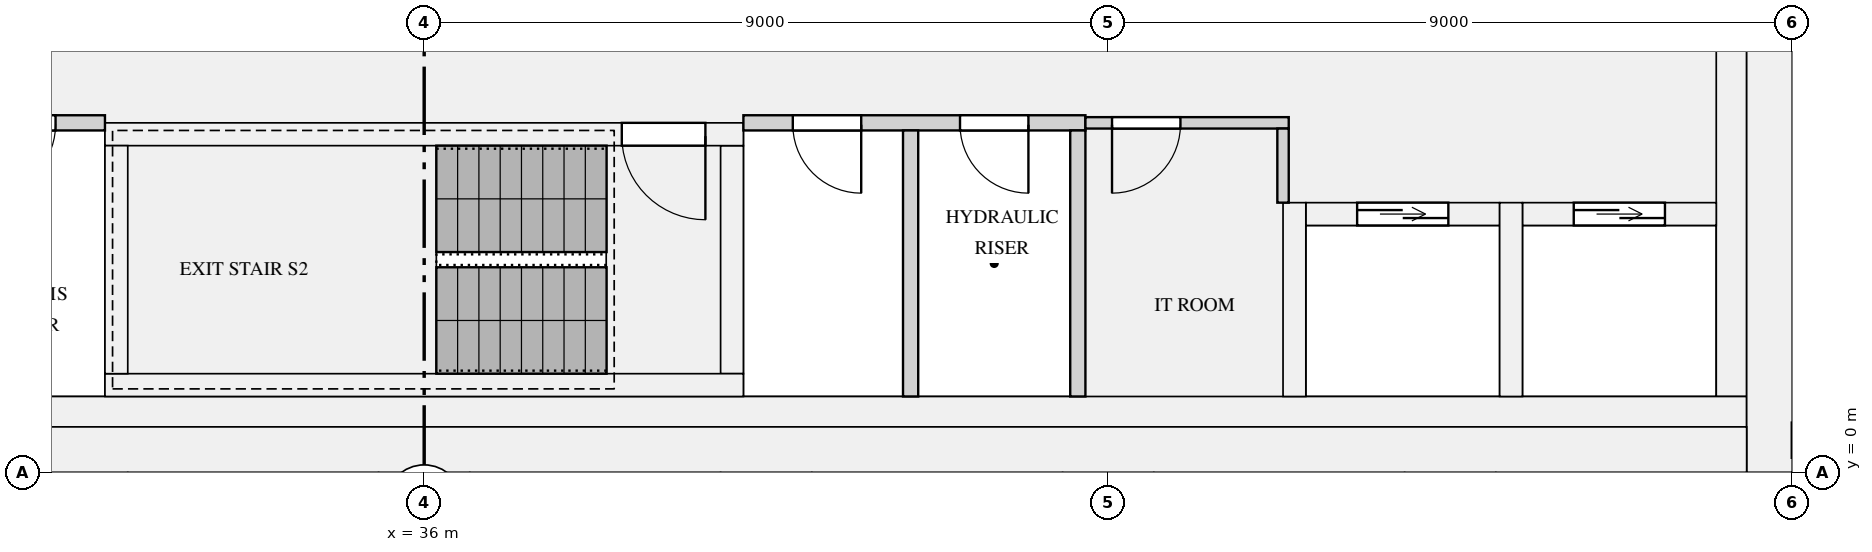
"""IFC4 building model, lengths in metres.
Left out: names, types, materials, properties, quantities, classifications, styles, units other than length and angle.
Written with IfcOpenShell. Run it as: python <this file> out.ifc"""

import sys

from ifc_helpers import new_model, si_unit, direction, frame, frame_2d, origin, place, context, subcontext, project, spatial, rectangle, extrude, element, fill, save


model = new_model("IFC4")
c1 = context("Model", 3, precision=1e-05, world=origin(), true_north=direction((0.0, 1.0)))
c2 = subcontext(c1, "Body", "Model", "MODEL_VIEW")
j1 = project(units=[si_unit("LENGTHUNIT", "METRE"), si_unit("PLANEANGLEUNIT", "RADIAN")], contexts=[c1])
p1 = place(None, origin())
s1 = spatial("IfcSite", under=j1, at=p1, CompositionType="ELEMENT")
p2 = place(p1, origin())
s2 = spatial("IfcBuilding", under=s1, at=p2, CompositionType="ELEMENT")
p3 = place(p2, frame((0.0, 0.0, 216.9)))
s3 = spatial("IfcBuildingStorey", under=s2, at=p3, CompositionType="ELEMENT", Elevation=216.9)
p4 = place(p3, frame((53.7, 0.0, 0.0), z_axis=(0.0, 0.0, 1.0), x_axis=(0.0, 1.0, 0.0)))
e1 = element("IfcWall", 1, at=p4, inside=s3, PredefinedType="SHEAR", context=c2, shape_type="SweptSolid", body=[
    extrude(rectangle(XDim=12.5, YDim=0.6, at=frame_2d((6.25, 0.0))), origin(), (0.0, 0.0, 1.0), 3.15),
])
p5 = place(p3, frame((18.6, 0.3, 0.0), z_axis=(0.0, 0.0, 1.0), x_axis=(1.0, 0.0, 0.0)))
e2 = element("IfcWall", 2, at=p5, inside=s3, PredefinedType="SHEAR", context=c2, shape_type="SweptSolid", body=[
    extrude(rectangle(XDim=34.8, YDim=0.6, at=frame_2d((17.4, 0.0))), origin(), (0.0, 0.0, 1.0), 3.15),
])
p6 = place(p3, frame((53.2, 1.0, 0.0), z_axis=(0.0, 0.0, 1.0), x_axis=(0.0, 1.0, 0.0)))
e3 = element("IfcWall", 3, at=p6, inside=s3, PredefinedType="SHEAR", context=c2, shape_type="SweptSolid", body=[
    extrude(rectangle(XDim=10.9, YDim=0.4, at=frame_2d((5.45, 0.0))), origin(), (0.0, 0.0, 1.0), 3.15),
])
p7 = place(p3, frame((18.6, 0.8, 0.0), z_axis=(0.0, 0.0, 1.0), x_axis=(1.0, 0.0, 0.0)))
e4 = element("IfcWall", 4, at=p7, inside=s3, PredefinedType="SHEAR", context=c2, shape_type="SweptSolid", body=[
    extrude(rectangle(XDim=34.8, YDim=0.4, at=frame_2d((17.4, 0.0))), origin(), (0.0, 0.0, 1.0), 3.15),
])
p8 = place(p3, frame((47.6, 3.4, 0.0), z_axis=(0.0, 0.0, 1.0), x_axis=(1.0, 0.0, 0.0)))
e5 = element("IfcWall", 5, at=p8, inside=s3, PredefinedType="SHEAR", context=c2, shape_type="SweptSolid", body=[
    extrude(rectangle(XDim=2.55, YDim=0.3, at=frame_2d((1.275, 0.0))), origin(), (0.0, 0.0, 1.0), 3.15),
])
p9 = place(p8, frame((0.675, 0.0, 0.0)))
e6 = element("IfcOpeningElement", 6, at=p9, cuts=e5, PredefinedType="OPENING", context=c2, shape_type="SweptSolid", body=[
    extrude(rectangle(XDim=1.2, YDim=2.1, at=frame_2d((0.6, 1.05))), frame((0.0, 0.16, 0.0), z_axis=(0.0, -1.0, 0.0), x_axis=(1.0, 0.0, 0.0)), (0.0, 0.0, 1.0), 0.32),
])
p10 = place(p3, frame((47.45, 1.0, 0.0), z_axis=(0.0, 0.0, 1.0), x_axis=(0.0, 1.0, 0.0)))
e7 = element("IfcWall", 7, at=p10, inside=s3, PredefinedType="SHEAR", context=c2, shape_type="SweptSolid", body=[
    extrude(rectangle(XDim=2.55, YDim=0.3, at=frame_2d((1.275, 0.0))), origin(), (0.0, 0.0, 1.0), 3.15),
])
p11 = place(p3, frame((50.45, 3.4, 0.0), z_axis=(0.0, 0.0, 1.0), x_axis=(1.0, 0.0, 0.0)))
e8 = element("IfcWall", 8, at=p11, inside=s3, PredefinedType="SHEAR", context=c2, shape_type="SweptSolid", body=[
    extrude(rectangle(XDim=2.55, YDim=0.3, at=frame_2d((1.275, 0.0))), origin(), (0.0, 0.0, 1.0), 3.15),
])
p12 = place(p11, frame((0.675, 0.0, 0.0)))
e9 = element("IfcOpeningElement", 9, at=p12, cuts=e8, PredefinedType="OPENING", context=c2, shape_type="SweptSolid", body=[
    extrude(rectangle(XDim=1.2, YDim=2.1, at=frame_2d((0.6, 1.05))), frame((0.0, 0.16, 0.0), z_axis=(0.0, -1.0, 0.0), x_axis=(1.0, 0.0, 0.0)), (0.0, 0.0, 1.0), 0.32),
])
p13 = place(p3, frame((50.3, 1.0, 0.0), z_axis=(0.0, 0.0, 1.0), x_axis=(0.0, 1.0, 0.0)))
e10 = element("IfcWall", 10, at=p13, inside=s3, PredefinedType="SHEAR", context=c2, shape_type="SweptSolid", body=[
    extrude(rectangle(XDim=2.55, YDim=0.3, at=frame_2d((1.275, 0.0))), origin(), (0.0, 0.0, 1.0), 3.15),
])
p14 = place(p3, frame((31.8, 1.15, 0.0), z_axis=(0.0, 0.0, 1.0), x_axis=(1.0, 0.0, 0.0)))
e11 = element("IfcWall", 11, at=p14, inside=s3, PredefinedType="SHEAR", context=c2, shape_type="SweptSolid", body=[
    extrude(rectangle(XDim=8.4, YDim=0.3, at=frame_2d((4.2, 0.0))), origin(), (0.0, 0.0, 1.0), 3.15),
])
p15 = place(p3, frame((31.8, 4.45, 0.0), z_axis=(0.0, 0.0, 1.0), x_axis=(1.0, 0.0, 0.0)))
e12 = element("IfcWall", 12, at=p15, inside=s3, PredefinedType="SHEAR", context=c2, shape_type="SweptSolid", body=[
    extrude(rectangle(XDim=8.4, YDim=0.3, at=frame_2d((4.2, 0.0))), origin(), (0.0, 0.0, 1.0), 3.15),
])
p16 = place(p15, frame((6.8, 0.0, 0.0)))
e13 = element("IfcOpeningElement", 13, at=p16, cuts=e12, PredefinedType="OPENING", context=c2, shape_type="SweptSolid", body=[
    extrude(rectangle(XDim=1.1, YDim=2.1, at=frame_2d((0.55, 1.05))), frame((0.0, 0.16, 0.0), z_axis=(0.0, -1.0, 0.0), x_axis=(1.0, 0.0, 0.0)), (0.0, 0.0, 1.0), 0.32),
])
for number, where, z_axis, x_axis in (
    (14, (31.95, 1.3, 0.0), (0.0, 0.0, 1.0), (0.0, 1.0, 0.0)),
    (15, (40.05, 1.3, 0.0), (0.0, 0.0, 1.0), (0.0, 1.0, 0.0)),
):
    element("IfcWall", number, at=place(p3, frame(where, z_axis=z_axis, x_axis=x_axis)), inside=s3, PredefinedType="SHEAR", context=c2, shape_type="SweptSolid", body=[
        extrude(rectangle(XDim=3.0, YDim=0.3, at=frame_2d((1.5, 0.0))), origin(), (0.0, 0.0, 1.0), 3.15),
    ])
p17 = place(p3, frame((54.0, 0.425, 0.9), z_axis=(0.0, 0.0, 1.0), x_axis=(1.0, 0.0, 0.0)))
e16 = element("IfcWall", 16, at=p17, inside=s3, PredefinedType="SOLIDWALL", context=c2, shape_type="SweptSolid", body=[
    extrude(rectangle(XDim=4.05, YDim=0.45, at=frame_2d((2.025, 0.0))), origin(), (0.0, 0.0, 1.0), 1.93),
])
p18 = place(p17, frame((1.275, 0.0, 0.15)))
e17 = element("IfcOpeningElement", 17, at=p18, cuts=e16, PredefinedType="OPENING", context=c2, shape_type="SweptSolid", body=[
    extrude(rectangle(XDim=1.5, YDim=1.5, at=frame_2d((0.75, 0.75))), frame((0.0, 0.235, 0.0), z_axis=(0.0, -1.0, 0.0), x_axis=(1.0, 0.0, 0.0)), (0.0, 0.0, 1.0), 0.47),
])
p19 = place(p3, frame((27.3, 4.6, 0.0), z_axis=(0.0, 0.0, 1.0), x_axis=(1.0, 0.0, 0.0)))
e18 = element("IfcWall", 18, at=p19, inside=s3, PredefinedType="PARTITIONING", context=c2, shape_type="SweptSolid", body=[
    extrude(rectangle(XDim=4.5, YDim=0.2, at=frame_2d((2.25, 0.0))), origin(), (0.0, 0.0, 1.0), 2.83),
])
p20 = place(p19, frame((0.75, 0.0, 0.0)))
e19 = element("IfcOpeningElement", 19, at=p20, cuts=e18, PredefinedType="OPENING", context=c2, shape_type="SweptSolid", body=[
    extrude(rectangle(XDim=0.9, YDim=2.1, at=frame_2d((0.45, 1.05))), frame((0.0, 0.11, 0.0), z_axis=(0.0, -1.0, 0.0), x_axis=(1.0, 0.0, 0.0)), (0.0, 0.0, 1.0), 0.22),
])
p21 = place(p19, frame((2.95, 0.0, 0.0)))
e20 = element("IfcOpeningElement", 20, at=p21, cuts=e18, PredefinedType="OPENING", context=c2, shape_type="SweptSolid", body=[
    extrude(rectangle(XDim=0.9, YDim=2.1, at=frame_2d((0.45, 1.05))), frame((0.0, 0.11, 0.0), z_axis=(0.0, -1.0, 0.0), x_axis=(1.0, 0.0, 0.0)), (0.0, 0.0, 1.0), 0.22),
])
p22 = place(p3, frame((40.2, 4.6, 0.0), z_axis=(0.0, 0.0, 1.0), x_axis=(1.0, 0.0, 0.0)))
e21 = element("IfcWall", 21, at=p22, inside=s3, PredefinedType="PARTITIONING", context=c2, shape_type="SweptSolid", body=[
    extrude(rectangle(XDim=4.5, YDim=0.2, at=frame_2d((2.25, 0.0))), origin(), (0.0, 0.0, 1.0), 2.83),
])
p23 = place(p22, frame((0.65, 0.0, 0.0)))
e22 = element("IfcOpeningElement", 22, at=p23, cuts=e21, PredefinedType="OPENING", context=c2, shape_type="SweptSolid", body=[
    extrude(rectangle(XDim=0.9, YDim=2.1, at=frame_2d((0.45, 1.05))), frame((0.0, 0.11, 0.0), z_axis=(0.0, -1.0, 0.0), x_axis=(1.0, 0.0, 0.0)), (0.0, 0.0, 1.0), 0.22),
])
p24 = place(p22, frame((2.85, 0.0, 0.0)))
e23 = element("IfcOpeningElement", 23, at=p24, cuts=e21, PredefinedType="OPENING", context=c2, shape_type="SweptSolid", body=[
    extrude(rectangle(XDim=0.9, YDim=2.1, at=frame_2d((0.45, 1.05))), frame((0.0, 0.11, 0.0), z_axis=(0.0, -1.0, 0.0), x_axis=(1.0, 0.0, 0.0)), (0.0, 0.0, 1.0), 0.22),
])
p25 = place(p3, frame((44.7, 4.6, 0.0), z_axis=(0.0, 0.0, 1.0), x_axis=(1.0, 0.0, 0.0)))
e24 = element("IfcWall", 24, at=p25, inside=s3, PredefinedType="PARTITIONING", context=c2, shape_type="SweptSolid", body=[
    extrude(rectangle(XDim=2.675, YDim=0.15, at=frame_2d((1.337, 0.0))), origin(), (0.0, 0.0, 1.0), 2.83),
])
p26 = place(p25, frame((0.35, 0.0, 0.0)))
e25 = element("IfcOpeningElement", 25, at=p26, cuts=e24, PredefinedType="OPENING", context=c2, shape_type="SweptSolid", body=[
    extrude(rectangle(XDim=0.9, YDim=2.1, at=frame_2d((0.45, 1.05))), frame((0.0, 0.085, 0.0), z_axis=(0.0, -1.0, 0.0), x_axis=(1.0, 0.0, 0.0)), (0.0, 0.0, 1.0), 0.17),
])
for number, where, z_axis, x_axis in (
    (26, (42.4, 1.0, 0.0), (0.0, 0.0, 1.0), (0.0, 1.0, 0.0)),
    (27, (44.6, 1.0, 0.0), (0.0, 0.0, 1.0), (0.0, 1.0, 0.0)),
):
    element("IfcWall", number, at=place(p3, frame(where, z_axis=z_axis, x_axis=x_axis)), inside=s3, PredefinedType="PARTITIONING", context=c2, shape_type="SweptSolid", body=[
        extrude(rectangle(XDim=3.5, YDim=0.2, at=frame_2d((1.75, 0.0))), origin(), (0.0, 0.0, 1.0), 2.83),
    ])
p27 = place(p3, frame((47.3, 3.55, 0.0), z_axis=(0.0, 0.0, 1.0), x_axis=(0.0, 1.0, 0.0)))
e28 = element("IfcWall", 28, at=p27, inside=s3, PredefinedType="PARTITIONING", context=c2, shape_type="SweptSolid", body=[
    extrude(rectangle(XDim=0.975, YDim=0.15, at=frame_2d((0.487, 0.0))), origin(), (0.0, 0.0, 1.0), 2.83),
])
p28 = place(p9, origin())
e29 = element("IfcDoor", 29, at=p28, inside=s3, OperationType="DOUBLE_DOOR_SLIDING", PredefinedType="DOOR", context=c2, shape_type="SweptSolid", body=[
    extrude(rectangle(XDim=1.2, YDim=2.1, at=frame_2d((0.6, 1.05))), frame((0.0, 0.025, 0.0), z_axis=(0.0, -1.0, 0.0), x_axis=(1.0, 0.0, 0.0)), (0.0, 0.0, 1.0), 0.05),
])
fill(e6, e29)
p29 = place(p12, origin())
e30 = element("IfcDoor", 30, at=p29, inside=s3, OperationType="DOUBLE_DOOR_SLIDING", PredefinedType="DOOR", context=c2, shape_type="SweptSolid", body=[
    extrude(rectangle(XDim=1.2, YDim=2.1, at=frame_2d((0.6, 1.05))), frame((0.0, 0.025, 0.0), z_axis=(0.0, -1.0, 0.0), x_axis=(1.0, 0.0, 0.0)), (0.0, 0.0, 1.0), 0.05),
])
fill(e9, e30)
p30 = place(p16, frame((1.1, 0.0, 0.0), z_axis=(0.0, 0.0, 1.0), x_axis=(-1.0, 0.0, 0.0)))
e31 = element("IfcDoor", 31, at=p30, inside=s3, OperationType="SINGLE_SWING_LEFT", PredefinedType="DOOR", context=c2, shape_type="SweptSolid", body=[
    extrude(rectangle(XDim=1.1, YDim=2.1, at=frame_2d((0.55, 1.05))), frame((0.0, 0.025, 0.0), z_axis=(0.0, -1.0, 0.0), x_axis=(1.0, 0.0, 0.0)), (0.0, 0.0, 1.0), 0.05),
])
fill(e13, e31)
p31 = place(p26, frame((0.9, 0.0, 0.0), z_axis=(0.0, 0.0, 1.0), x_axis=(-1.0, 0.0, 0.0)))
e32 = element("IfcDoor", 32, at=p31, inside=s3, OperationType="SINGLE_SWING_RIGHT", PredefinedType="DOOR", context=c2, shape_type="SweptSolid", body=[
    extrude(rectangle(XDim=0.9, YDim=2.1, at=frame_2d((0.45, 1.05))), frame((0.0, 0.025, 0.0), z_axis=(0.0, -1.0, 0.0), x_axis=(1.0, 0.0, 0.0)), (0.0, 0.0, 1.0), 0.05),
])
fill(e25, e32)
p32 = place(p21, frame((0.9, 0.0, 0.0), z_axis=(0.0, 0.0, 1.0), x_axis=(-1.0, 0.0, 0.0)))
e33 = element("IfcDoor", 33, at=p32, inside=s3, OperationType="SINGLE_SWING_RIGHT", PredefinedType="DOOR", context=c2, shape_type="SweptSolid", body=[
    extrude(rectangle(XDim=0.9, YDim=2.1, at=frame_2d((0.45, 1.05))), frame((0.0, 0.025, 0.0), z_axis=(0.0, -1.0, 0.0), x_axis=(1.0, 0.0, 0.0)), (0.0, 0.0, 1.0), 0.05),
])
fill(e20, e33)
p33 = place(p23, frame((0.9, 0.0, 0.0), z_axis=(0.0, 0.0, 1.0), x_axis=(-1.0, 0.0, 0.0)))
e34 = element("IfcDoor", 34, at=p33, inside=s3, OperationType="SINGLE_SWING_LEFT", PredefinedType="DOOR", context=c2, shape_type="SweptSolid", body=[
    extrude(rectangle(XDim=0.9, YDim=2.1, at=frame_2d((0.45, 1.05))), frame((0.0, 0.025, 0.0), z_axis=(0.0, -1.0, 0.0), x_axis=(1.0, 0.0, 0.0)), (0.0, 0.0, 1.0), 0.05),
])
fill(e22, e34)
p34 = place(p24, frame((0.9, 0.0, 0.0), z_axis=(0.0, 0.0, 1.0), x_axis=(-1.0, 0.0, 0.0)))
e35 = element("IfcDoor", 35, at=p34, inside=s3, OperationType="SINGLE_SWING_LEFT", PredefinedType="DOOR", context=c2, shape_type="SweptSolid", body=[
    extrude(rectangle(XDim=0.9, YDim=2.1, at=frame_2d((0.45, 1.05))), frame((0.0, 0.025, 0.0), z_axis=(0.0, -1.0, 0.0), x_axis=(1.0, 0.0, 0.0)), (0.0, 0.0, 1.0), 0.05),
])
fill(e23, e35)
save(model, sys.argv[1])
